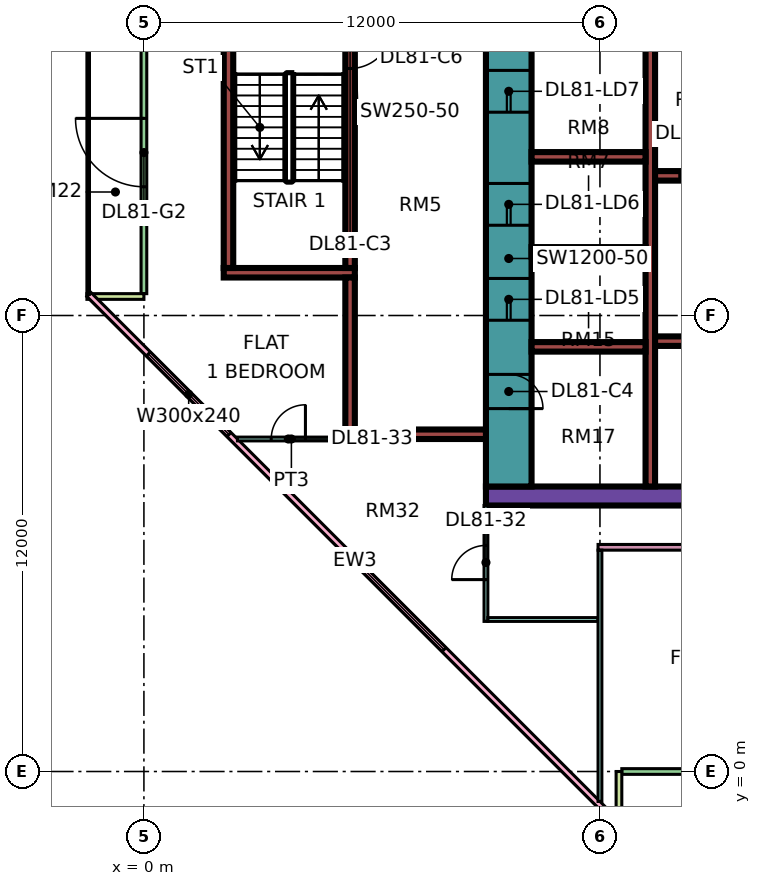
"""IFC4 building model, lengths in metres.
Left out: names, types, materials, properties, quantities, classifications, styles, units other than length and angle.
Written with IfcOpenShell. Run it as: python <this file> out.ifc"""

import sys

from ifc_helpers import new_model, si_unit, direction, frame, frame_2d, origin, place, context, subcontext, project, spatial, rectangle, extrude, element, fill, save


model = new_model("IFC4")
c1 = context("Model", 3, precision=1e-05, world=origin(), true_north=direction((0.0, 1.0)))
c2 = subcontext(c1, "Body", "Model", "MODEL_VIEW")
j1 = project(units=[si_unit("LENGTHUNIT", "METRE"), si_unit("PLANEANGLEUNIT", "RADIAN")], contexts=[c1])
p1 = place(None, origin())
s1 = spatial("IfcSite", under=j1, at=p1, CompositionType="ELEMENT")
p2 = place(p1, origin())
s2 = spatial("IfcBuilding", under=s1, at=p2, CompositionType="ELEMENT")
p3 = place(p2, frame((0.0, 0.0, 350.15)))
s3 = spatial("IfcBuildingStorey", under=s2, at=p3, CompositionType="ELEMENT", Elevation=350.15)
p4 = place(p3, frame((9.0, 7.25, 0.0), z_axis=(0.0, 0.0, 1.0), x_axis=(1.0, 0.0, 0.0)))
e1 = element("IfcWall", 1, at=p4, inside=s3, PredefinedType="SHEAR", context=c2, shape_type="SweptSolid", body=[
    extrude(rectangle(XDim=25.0, YDim=0.5, at=frame_2d((12.5, 0.0))), origin(), (0.0, 0.0, 1.0), 3.75),
])
p5 = place(p3, frame((9.6, 7.5, 0.0), z_axis=(0.0, 0.0, 1.0), x_axis=(0.0, 1.0, 0.0)))
e2 = element("IfcWall", 2, at=p5, inside=s3, PredefinedType="SHEAR", context=c2, shape_type="SweptSolid", body=[
    extrude(rectangle(XDim=12.0, YDim=1.2, at=frame_2d((6.0, 0.0))), origin(), (0.0, 0.0, 1.0), 3.75),
])
p6 = place(p5, frame((4.375, 0.0, 0.0)))
e3 = element("IfcOpeningElement", 3, at=p6, cuts=e2, PredefinedType="OPENING", context=c2, shape_type="SweptSolid", body=[
    extrude(rectangle(XDim=1.1, YDim=2.2, at=frame_2d((0.55, 1.1))), frame((0.0, 0.61, 0.0), z_axis=(0.0, -1.0, 0.0), x_axis=(1.0, 0.0, 0.0)), (0.0, 0.0, 1.0), 1.22),
])
p7 = place(p5, frame((6.875, 0.0, 0.0)))
e4 = element("IfcOpeningElement", 4, at=p7, cuts=e2, PredefinedType="OPENING", context=c2, shape_type="SweptSolid", body=[
    extrude(rectangle(XDim=1.1, YDim=2.2, at=frame_2d((0.55, 1.1))), frame((0.0, 0.61, 0.0), z_axis=(0.0, -1.0, 0.0), x_axis=(1.0, 0.0, 0.0)), (0.0, 0.0, 1.0), 1.22),
])
p8 = place(p5, frame((9.85, 0.0, 0.0)))
e5 = element("IfcOpeningElement", 5, at=p8, cuts=e2, PredefinedType="OPENING", context=c2, shape_type="SweptSolid", body=[
    extrude(rectangle(XDim=1.1, YDim=2.2, at=frame_2d((0.55, 1.1))), frame((0.0, 0.61, 0.0), z_axis=(0.0, -1.0, 0.0), x_axis=(1.0, 0.0, 0.0)), (0.0, 0.0, 1.0), 1.22),
])
p9 = place(p5, frame((2.05, 0.0, 0.0)))
e6 = element("IfcOpeningElement", 6, at=p9, cuts=e2, PredefinedType="OPENING", context=c2, shape_type="SweptSolid", body=[
    extrude(rectangle(XDim=0.9, YDim=2.1, at=frame_2d((0.45, 1.05))), frame((0.0, 0.61, 0.0), z_axis=(0.0, -1.0, 0.0), x_axis=(1.0, 0.0, 0.0)), (0.0, 0.0, 1.0), 1.22),
])
p10 = place(p3, frame((13.325, 7.5, 0.0), z_axis=(0.0, 0.0, 1.0), x_axis=(0.0, 1.0, 0.0)))
e7 = element("IfcWall", 7, at=p10, inside=s3, PredefinedType="SHEAR", context=c2, shape_type="SweptSolid", body=[
    extrude(rectangle(XDim=12.0, YDim=0.25, at=frame_2d((6.0, 0.0))), origin(), (0.0, 0.0, 1.0), 3.75),
])
p11 = place(p3, frame((13.45, 11.325, 0.0), z_axis=(0.0, 0.0, 1.0), x_axis=(1.0, 0.0, 0.0)))
e8 = element("IfcWall", 8, at=p11, inside=s3, PredefinedType="SHEAR", context=c2, shape_type="SweptSolid", body=[
    extrude(rectangle(XDim=20.05, YDim=0.25, at=frame_2d((10.025, 0.0))), origin(), (0.0, 0.0, 1.0), 3.75),
])
p12 = place(p11, frame((4.925, 0.0, 0.0)))
e9 = element("IfcOpeningElement", 9, at=p12, cuts=e8, PredefinedType="OPENING", context=c2, shape_type="SweptSolid", body=[
    extrude(rectangle(XDim=0.9, YDim=2.1, at=frame_2d((0.45, 1.05))), frame((0.0, 0.135, 0.0), z_axis=(0.0, -1.0, 0.0), x_axis=(1.0, 0.0, 0.0)), (0.0, 0.0, 1.0), 0.27),
])
p13 = place(p11, frame((12.3, 0.0, 0.0)))
e10 = element("IfcOpeningElement", 10, at=p13, cuts=e8, PredefinedType="OPENING", context=c2, shape_type="SweptSolid", body=[
    extrude(rectangle(XDim=0.9, YDim=2.1, at=frame_2d((0.45, 1.05))), frame((0.0, 0.135, 0.0), z_axis=(0.0, -1.0, 0.0), x_axis=(1.0, 0.0, 0.0)), (0.0, 0.0, 1.0), 0.27),
])
p14 = place(p11, frame((16.825, 0.0, 0.0)))
e11 = element("IfcOpeningElement", 11, at=p14, cuts=e8, PredefinedType="OPENING", context=c2, shape_type="SweptSolid", body=[
    extrude(rectangle(XDim=0.9, YDim=2.1, at=frame_2d((0.45, 1.05))), frame((0.0, 0.135, 0.0), z_axis=(0.0, -1.0, 0.0), x_axis=(1.0, 0.0, 0.0)), (0.0, 0.0, 1.0), 0.27),
])
p15 = place(p3, frame((13.45, 15.675, 0.0), z_axis=(0.0, 0.0, 1.0), x_axis=(1.0, 0.0, 0.0)))
e12 = element("IfcWall", 12, at=p15, inside=s3, PredefinedType="SHEAR", context=c2, shape_type="SweptSolid", body=[
    extrude(rectangle(XDim=13.75, YDim=0.25, at=frame_2d((6.875, 0.0))), origin(), (0.0, 0.0, 1.0), 3.75),
])
p16 = place(p15, frame((0.65, 0.0, 0.0)))
e13 = element("IfcOpeningElement", 13, at=p16, cuts=e12, PredefinedType="OPENING", context=c2, shape_type="SweptSolid", body=[
    extrude(rectangle(XDim=1.2, YDim=2.2, at=frame_2d((0.6, 1.1))), frame((0.0, 0.135, 0.0), z_axis=(0.0, -1.0, 0.0), x_axis=(1.0, 0.0, 0.0)), (0.0, 0.0, 1.0), 0.27),
])
p17 = place(p15, frame((3.4, 0.0, 0.0)))
e14 = element("IfcOpeningElement", 14, at=p17, cuts=e12, PredefinedType="OPENING", context=c2, shape_type="SweptSolid", body=[
    extrude(rectangle(XDim=1.2, YDim=2.2, at=frame_2d((0.6, 1.1))), frame((0.0, 0.135, 0.0), z_axis=(0.0, -1.0, 0.0), x_axis=(1.0, 0.0, 0.0)), (0.0, 0.0, 1.0), 0.27),
])
p18 = place(p15, frame((6.15, 0.0, 0.0)))
e15 = element("IfcOpeningElement", 15, at=p18, cuts=e12, PredefinedType="OPENING", context=c2, shape_type="SweptSolid", body=[
    extrude(rectangle(XDim=1.2, YDim=2.2, at=frame_2d((0.6, 1.1))), frame((0.0, 0.135, 0.0), z_axis=(0.0, -1.0, 0.0), x_axis=(1.0, 0.0, 0.0)), (0.0, 0.0, 1.0), 0.27),
])
p19 = place(p15, frame((8.9, 0.0, 0.0)))
e16 = element("IfcOpeningElement", 16, at=p19, cuts=e12, PredefinedType="OPENING", context=c2, shape_type="SweptSolid", body=[
    extrude(rectangle(XDim=1.2, YDim=2.2, at=frame_2d((0.6, 1.1))), frame((0.0, 0.135, 0.0), z_axis=(0.0, -1.0, 0.0), x_axis=(1.0, 0.0, 0.0)), (0.0, 0.0, 1.0), 0.27),
])
p20 = place(p15, frame((11.8, 0.0, 0.0)))
e17 = element("IfcOpeningElement", 17, at=p20, cuts=e12, PredefinedType="OPENING", context=c2, shape_type="SweptSolid", body=[
    extrude(rectangle(XDim=0.9, YDim=2.1, at=frame_2d((0.45, 1.05))), frame((0.0, 0.135, 0.0), z_axis=(0.0, -1.0, 0.0), x_axis=(1.0, 0.0, 0.0)), (0.0, 0.0, 1.0), 0.27),
])
for number, where, z_axis, x_axis in (
    (18, (10.2, 11.175, 0.0), (0.0, 0.0, 1.0), (1.0, 0.0, 0.0)),
    (19, (10.2, 13.675, 0.0), (0.0, 0.0, 1.0), (1.0, 0.0, 0.0)),
    (20, (10.2, 16.175, 0.0), (0.0, 0.0, 1.0), (1.0, 0.0, 0.0)),
):
    element("IfcWall", number, at=place(p3, frame(where, z_axis=z_axis, x_axis=x_axis)), inside=s3, PredefinedType="SHEAR", context=c2, shape_type="SweptSolid", body=[
        extrude(rectangle(XDim=3.0, YDim=0.25, at=frame_2d((1.5, 0.0))), origin(), (0.0, 0.0, 1.0), 3.75),
    ])
p21 = place(p3, frame((2.1, 13.125, 0.0), z_axis=(0.0, 0.0, 1.0), x_axis=(1.0, 0.0, 0.0)))
e21 = element("IfcWall", 21, at=p21, inside=s3, PredefinedType="SHEAR", context=c2, shape_type="SweptSolid", body=[
    extrude(rectangle(XDim=3.45, YDim=0.25, at=frame_2d((1.725, 0.0))), origin(), (0.0, 0.0, 1.0), 3.75),
])
p22 = place(p3, frame((2.225, 13.25, 0.0), z_axis=(0.0, 0.0, 1.0), x_axis=(0.0, 1.0, 0.0)))
e22 = element("IfcWall", 22, at=p22, inside=s3, PredefinedType="SHEAR", context=c2, shape_type="SweptSolid", body=[
    extrude(rectangle(XDim=6.5, YDim=0.25, at=frame_2d((3.25, 0.0))), origin(), (0.0, 0.0, 1.0), 3.75),
])
p23 = place(p3, frame((5.425, 13.25, 0.0), z_axis=(0.0, 0.0, 1.0), x_axis=(0.0, 1.0, 0.0)))
e23 = element("IfcWall", 23, at=p23, inside=s3, PredefinedType="SHEAR", context=c2, shape_type="SweptSolid", body=[
    extrude(rectangle(XDim=6.5, YDim=0.25, at=frame_2d((3.25, 0.0))), origin(), (0.0, 0.0, 1.0), 3.75),
])
p24 = place(p23, frame((5.25, 0.0, 0.0)))
e24 = element("IfcOpeningElement", 24, at=p24, cuts=e23, PredefinedType="OPENING", context=c2, shape_type="SweptSolid", body=[
    extrude(rectangle(XDim=1.1, YDim=2.2, at=frame_2d((0.55, 1.1))), frame((0.0, 0.135, 0.0), z_axis=(0.0, -1.0, 0.0), x_axis=(1.0, 0.0, 0.0)), (0.0, 0.0, 1.0), 0.27),
])
p25 = place(p3, frame((5.3, 8.875, 0.0), z_axis=(0.0, 0.0, 1.0), x_axis=(1.0, 0.0, 0.0)))
e25 = element("IfcWall", 25, at=p25, inside=s3, PredefinedType="SHEAR", context=c2, shape_type="SweptSolid", body=[
    extrude(rectangle(XDim=3.7, YDim=0.25, at=frame_2d((1.85, 0.0))), origin(), (0.0, 0.0, 1.0), 3.75),
])
p26 = place(p3, frame((5.425, 9.0, 0.0), z_axis=(0.0, 0.0, 1.0), x_axis=(0.0, 1.0, 0.0)))
e26 = element("IfcWall", 26, at=p26, inside=s3, PredefinedType="SHEAR", context=c2, shape_type="SweptSolid", body=[
    extrude(rectangle(XDim=4.0, YDim=0.25, at=frame_2d((2.0, 0.0))), origin(), (0.0, 0.0, 1.0), 3.75),
])
p27 = place(p3, frame((0.0, 23.925, 0.0), z_axis=(0.0, 0.0, 1.0), x_axis=(0.0, -1.0, 0.0)))
e27 = element("IfcWall", 27, at=p27, inside=s3, PredefinedType="SOLIDWALL", context=c2, shape_type="SweptSolid", body=[
    extrude(rectangle(XDim=11.35, YDim=0.15, at=frame_2d((5.675, 0.0))), origin(), (0.0, 0.0, 1.0), 3.35),
])
p28 = place(p27, frame((6.738, 0.0, 0.0)))
e28 = element("IfcOpeningElement", 28, at=p28, cuts=e27, PredefinedType="OPENING", context=c2, shape_type="SweptSolid", body=[
    extrude(rectangle(XDim=1.8, YDim=2.4, at=frame_2d((0.9, 1.2))), frame((0.0, 0.085, 0.0), z_axis=(0.0, -1.0, 0.0), x_axis=(1.0, 0.0, 0.0)), (0.0, 0.0, 1.0), 0.17),
])
p29 = place(p3, frame((-1.5, 12.5, 0.0), z_axis=(0.0, 0.0, 1.0), x_axis=(1.0, 0.0, 0.0)))
e29 = element("IfcWall", 29, at=p29, inside=s3, PredefinedType="SOLIDWALL", context=c2, shape_type="SweptSolid", body=[
    extrude(rectangle(XDim=1.5, YDim=0.15, at=frame_2d((0.75, 0.0))), origin(), (0.0, 0.0, 1.0), 3.35),
])
p30 = place(p3, frame((-1.447, 12.553, 0.0), z_axis=(0.0, 0.0, 1.0), x_axis=(0.707106781187, -0.707106781187, 0.0)))
e30 = element("IfcWall", 30, at=p30, inside=s3, PredefinedType="SOLIDWALL", context=c2, shape_type="SweptSolid", body=[
    extrude(rectangle(XDim=19.799, YDim=0.15, at=frame_2d((9.899, 0.0))), origin(), (0.0, 0.0, 1.0), 3.35),
])
p31 = place(p30, frame((2.212, 0.0, 0.45)))
e31 = element("IfcOpeningElement", 31, at=p31, cuts=e30, PredefinedType="OPENING", context=c2, shape_type="SweptSolid", body=[
    extrude(rectangle(XDim=3.0, YDim=2.4, at=frame_2d((1.5, 1.2))), frame((0.0, 0.085, 0.0), z_axis=(0.0, -1.0, 0.0), x_axis=(1.0, 0.0, 0.0)), (0.0, 0.0, 1.0), 0.17),
])
p32 = place(p30, frame((10.216, 0.0, 0.45)))
e32 = element("IfcOpeningElement", 32, at=p32, cuts=e30, PredefinedType="OPENING", context=c2, shape_type="SweptSolid", body=[
    extrude(rectangle(XDim=3.0, YDim=2.4, at=frame_2d((1.5, 1.2))), frame((0.0, 0.085, 0.0), z_axis=(0.0, -1.0, 0.0), x_axis=(1.0, 0.0, 0.0)), (0.0, 0.0, 1.0), 0.17),
])
p33 = place(p3, frame((12.575, 0.0, 0.0), z_axis=(0.0, 0.0, 1.0), x_axis=(1.0, 0.0, 0.0)))
e33 = element("IfcWall", 33, at=p33, inside=s3, PredefinedType="SOLIDWALL", context=c2, shape_type="SweptSolid", body=[
    extrude(rectangle(XDim=11.35, YDim=0.15, at=frame_2d((5.675, 0.0))), origin(), (0.0, 0.0, 1.0), 3.35),
])
p34 = place(p33, frame((3.312, 0.0, 0.0)))
e34 = element("IfcOpeningElement", 34, at=p34, cuts=e33, PredefinedType="OPENING", context=c2, shape_type="SweptSolid", body=[
    extrude(rectangle(XDim=1.8, YDim=2.4, at=frame_2d((0.9, 1.2))), frame((0.0, 0.085, 0.0), z_axis=(0.0, -1.0, 0.0), x_axis=(1.0, 0.0, 0.0)), (0.0, 0.0, 1.0), 0.17),
])
p35 = place(p33, frame((8.788, 0.0, 0.45)))
e35 = element("IfcOpeningElement", 35, at=p35, cuts=e33, PredefinedType="OPENING", context=c2, shape_type="SweptSolid", body=[
    extrude(rectangle(XDim=1.8, YDim=2.4, at=frame_2d((0.9, 1.2))), frame((0.0, 0.085, 0.0), z_axis=(0.0, -1.0, 0.0), x_axis=(1.0, 0.0, 0.0)), (0.0, 0.0, 1.0), 0.17),
])
p36 = place(p3, frame((12.5, -1.5, 0.0), z_axis=(0.0, 0.0, 1.0), x_axis=(0.0, 1.0, 0.0)))
e36 = element("IfcWall", 36, at=p36, inside=s3, PredefinedType="SOLIDWALL", context=c2, shape_type="SweptSolid", body=[
    extrude(rectangle(XDim=1.5, YDim=0.15, at=frame_2d((0.75, 0.0))), origin(), (0.0, 0.0, 1.0), 3.35),
])
p37 = place(p3, frame((2.461, 8.75, 0.0), z_axis=(0.0, 0.0, 1.0), x_axis=(1.0, 0.0, 0.0)))
e37 = element("IfcWall", 37, at=p37, inside=s3, PredefinedType="PARTITIONING", context=c2, shape_type="SweptSolid", body=[
    extrude(rectangle(XDim=2.839, YDim=0.1, at=frame_2d((1.419, 0.0))), origin(), (0.0, 0.0, 1.0), 3.35),
])
p38 = place(p37, frame((0.889, 0.0, 0.0)))
e38 = element("IfcOpeningElement", 38, at=p38, cuts=e37, PredefinedType="OPENING", context=c2, shape_type="SweptSolid", body=[
    extrude(rectangle(XDim=0.9, YDim=2.1, at=frame_2d((0.45, 1.05))), frame((0.0, 0.06, 0.0), z_axis=(0.0, -1.0, 0.0), x_axis=(1.0, 0.0, 0.0)), (0.0, 0.0, 1.0), 0.12),
])
p39 = place(p3, frame((9.0, 3.95, 0.0), z_axis=(0.0, 0.0, 1.0), x_axis=(0.0, 1.0, 0.0)))
e39 = element("IfcWall", 39, at=p39, inside=s3, PredefinedType="PARTITIONING", context=c2, shape_type="SweptSolid", body=[
    extrude(rectangle(XDim=3.05, YDim=0.1, at=frame_2d((1.525, 0.0))), origin(), (0.0, 0.0, 1.0), 3.35),
])
p40 = place(p39, frame((1.1, 0.0, 0.0)))
e40 = element("IfcOpeningElement", 40, at=p40, cuts=e39, PredefinedType="OPENING", context=c2, shape_type="SweptSolid", body=[
    extrude(rectangle(XDim=0.9, YDim=2.1, at=frame_2d((0.45, 1.05))), frame((0.0, 0.06, 0.0), z_axis=(0.0, -1.0, 0.0), x_axis=(1.0, 0.0, 0.0)), (0.0, 0.0, 1.0), 0.12),
])
p41 = place(p3, frame((9.05, 4.0, 0.0), z_axis=(0.0, 0.0, 1.0), x_axis=(1.0, 0.0, 0.0)))
e41 = element("IfcWall", 41, at=p41, inside=s3, PredefinedType="PARTITIONING", context=c2, shape_type="SweptSolid", body=[
    extrude(rectangle(XDim=2.9, YDim=0.1, at=frame_2d((1.45, 0.0))), origin(), (0.0, 0.0, 1.0), 3.35),
])
p42 = place(p3, frame((11.95, 5.9, 0.0), z_axis=(0.0, 0.0, 1.0), x_axis=(1.0, 0.0, 0.0)))
e42 = element("IfcWall", 42, at=p42, inside=s3, PredefinedType="PARTITIONING", context=c2, shape_type="SweptSolid", body=[
    extrude(rectangle(XDim=21.1, YDim=0.15, at=frame_2d((10.55, 0.0))), origin(), (0.0, 0.0, 1.0), 3.35),
])
p43 = place(p42, frame((16.1, 0.0, 0.0)))
e43 = element("IfcOpeningElement", 43, at=p43, cuts=e42, PredefinedType="OPENING", context=c2, shape_type="SweptSolid", body=[
    extrude(rectangle(XDim=0.9, YDim=2.1, at=frame_2d((0.45, 1.05))), frame((0.0, 0.085, 0.0), z_axis=(0.0, -1.0, 0.0), x_axis=(1.0, 0.0, 0.0)), (0.0, 0.0, 1.0), 0.17),
])
p44 = place(p42, frame((13.1, 0.0, 0.0)))
e44 = element("IfcOpeningElement", 44, at=p44, cuts=e42, PredefinedType="OPENING", context=c2, shape_type="SweptSolid", body=[
    extrude(rectangle(XDim=0.9, YDim=2.1, at=frame_2d((0.45, 1.05))), frame((0.0, 0.085, 0.0), z_axis=(0.0, -1.0, 0.0), x_axis=(1.0, 0.0, 0.0)), (0.0, 0.0, 1.0), 0.17),
])
p45 = place(p42, frame((4.1, 0.0, 0.0)))
e45 = element("IfcOpeningElement", 45, at=p45, cuts=e42, PredefinedType="OPENING", context=c2, shape_type="SweptSolid", body=[
    extrude(rectangle(XDim=0.9, YDim=2.1, at=frame_2d((0.45, 1.05))), frame((0.0, 0.085, 0.0), z_axis=(0.0, -1.0, 0.0), x_axis=(1.0, 0.0, 0.0)), (0.0, 0.0, 1.0), 0.17),
])
p46 = place(p3, frame((12.0, -0.788, 0.0), z_axis=(0.0, 0.0, 1.0), x_axis=(0.0, 1.0, 0.0)))
e46 = element("IfcWall", 46, at=p46, inside=s3, PredefinedType="PARTITIONING", context=c2, shape_type="SweptSolid", body=[
    extrude(rectangle(XDim=6.613, YDim=0.1, at=frame_2d((3.306, 0.0))), origin(), (0.0, 0.0, 1.0), 3.35),
])
p47 = place(p28, frame((1.8, 0.0, 0.0), z_axis=(0.0, 0.0, 1.0), x_axis=(-1.0, 0.0, 0.0)))
e47 = element("IfcDoor", 47, at=p47, inside=s3, OperationType="DOUBLE_DOOR_SINGLE_SWING", PredefinedType="DOOR", context=c2, shape_type="SweptSolid", body=[
    extrude(rectangle(XDim=1.8, YDim=2.4, at=frame_2d((0.9, 1.2))), frame((0.0, 0.025, 0.0), z_axis=(0.0, -1.0, 0.0), x_axis=(1.0, 0.0, 0.0)), (0.0, 0.0, 1.0), 0.05),
])
fill(e28, e47)
p48 = place(p31, origin())
e48 = element("IfcWindow", 48, at=p48, inside=s3, PartitioningType="SINGLE_PANEL", PredefinedType="WINDOW", context=c2, shape_type="SweptSolid", body=[
    extrude(rectangle(XDim=3.0, YDim=2.4, at=frame_2d((1.5, 1.2))), frame((0.0, 0.03, 0.0), z_axis=(0.0, -1.0, 0.0), x_axis=(1.0, 0.0, 0.0)), (0.0, 0.0, 1.0), 0.06),
])
fill(e31, e48)
p49 = place(p32, origin())
e49 = element("IfcWindow", 49, at=p49, inside=s3, PartitioningType="SINGLE_PANEL", PredefinedType="WINDOW", context=c2, shape_type="SweptSolid", body=[
    extrude(rectangle(XDim=3.0, YDim=2.4, at=frame_2d((1.5, 1.2))), frame((0.0, 0.03, 0.0), z_axis=(0.0, -1.0, 0.0), x_axis=(1.0, 0.0, 0.0)), (0.0, 0.0, 1.0), 0.06),
])
fill(e32, e49)
p50 = place(p16, origin())
e50 = element("IfcDoor", 50, at=p50, inside=s3, OperationType="DOUBLE_DOOR_SLIDING", PredefinedType="DOOR", context=c2, shape_type="SweptSolid", body=[
    extrude(rectangle(XDim=1.2, YDim=2.2, at=frame_2d((0.6, 1.1))), frame((0.0, 0.025, 0.0), z_axis=(0.0, -1.0, 0.0), x_axis=(1.0, 0.0, 0.0)), (0.0, 0.0, 1.0), 0.05),
])
fill(e13, e50)
p51 = place(p6, origin())
e51 = element("IfcDoor", 51, at=p51, inside=s3, OperationType="DOUBLE_DOOR_SLIDING", PredefinedType="DOOR", context=c2, shape_type="SweptSolid", body=[
    extrude(rectangle(XDim=1.1, YDim=2.2, at=frame_2d((0.55, 1.1))), frame((0.0, 0.025, 0.0), z_axis=(0.0, -1.0, 0.0), x_axis=(1.0, 0.0, 0.0)), (0.0, 0.0, 1.0), 0.05),
])
fill(e3, e51)
p52 = place(p7, origin())
e52 = element("IfcDoor", 52, at=p52, inside=s3, OperationType="DOUBLE_DOOR_SLIDING", PredefinedType="DOOR", context=c2, shape_type="SweptSolid", body=[
    extrude(rectangle(XDim=1.1, YDim=2.2, at=frame_2d((0.55, 1.1))), frame((0.0, 0.025, 0.0), z_axis=(0.0, -1.0, 0.0), x_axis=(1.0, 0.0, 0.0)), (0.0, 0.0, 1.0), 0.05),
])
fill(e4, e52)
p53 = place(p8, origin())
e53 = element("IfcDoor", 53, at=p53, inside=s3, OperationType="DOUBLE_DOOR_SLIDING", PredefinedType="DOOR", context=c2, shape_type="SweptSolid", body=[
    extrude(rectangle(XDim=1.1, YDim=2.2, at=frame_2d((0.55, 1.1))), frame((0.0, 0.025, 0.0), z_axis=(0.0, -1.0, 0.0), x_axis=(1.0, 0.0, 0.0)), (0.0, 0.0, 1.0), 0.05),
])
fill(e5, e53)
p54 = place(p24, origin())
e54 = element("IfcDoor", 54, at=p54, inside=s3, OperationType="SINGLE_SWING_RIGHT", PredefinedType="DOOR", context=c2, shape_type="SweptSolid", body=[
    extrude(rectangle(XDim=1.1, YDim=2.2, at=frame_2d((0.55, 1.1))), frame((0.0, 0.025, 0.0), z_axis=(0.0, -1.0, 0.0), x_axis=(1.0, 0.0, 0.0)), (0.0, 0.0, 1.0), 0.05),
])
fill(e24, e54)
p55 = place(p9, frame((0.9, 0.0, 0.0), z_axis=(0.0, 0.0, 1.0), x_axis=(-1.0, 0.0, 0.0)))
e55 = element("IfcDoor", 55, at=p55, inside=s3, OperationType="SINGLE_SWING_LEFT", PredefinedType="DOOR", context=c2, shape_type="SweptSolid", body=[
    extrude(rectangle(XDim=0.9, YDim=2.1, at=frame_2d((0.45, 1.05))), frame((0.0, 0.025, 0.0), z_axis=(0.0, -1.0, 0.0), x_axis=(1.0, 0.0, 0.0)), (0.0, 0.0, 1.0), 0.05),
])
fill(e6, e55)
p56 = place(p40, origin())
e56 = element("IfcDoor", 56, at=p56, inside=s3, OperationType="SINGLE_SWING_LEFT", PredefinedType="DOOR", context=c2, shape_type="SweptSolid", body=[
    extrude(rectangle(XDim=0.9, YDim=2.1, at=frame_2d((0.45, 1.05))), frame((0.0, 0.025, 0.0), z_axis=(0.0, -1.0, 0.0), x_axis=(1.0, 0.0, 0.0)), (0.0, 0.0, 1.0), 0.05),
])
fill(e40, e56)
p57 = place(p38, frame((0.9, 0.0, 0.0), z_axis=(0.0, 0.0, 1.0), x_axis=(-1.0, 0.0, 0.0)))
e57 = element("IfcDoor", 57, at=p57, inside=s3, OperationType="SINGLE_SWING_RIGHT", PredefinedType="DOOR", context=c2, shape_type="SweptSolid", body=[
    extrude(rectangle(XDim=0.9, YDim=2.1, at=frame_2d((0.45, 1.05))), frame((0.0, 0.025, 0.0), z_axis=(0.0, -1.0, 0.0), x_axis=(1.0, 0.0, 0.0)), (0.0, 0.0, 1.0), 0.05),
])
fill(e38, e57)
save(model, sys.argv[1])
